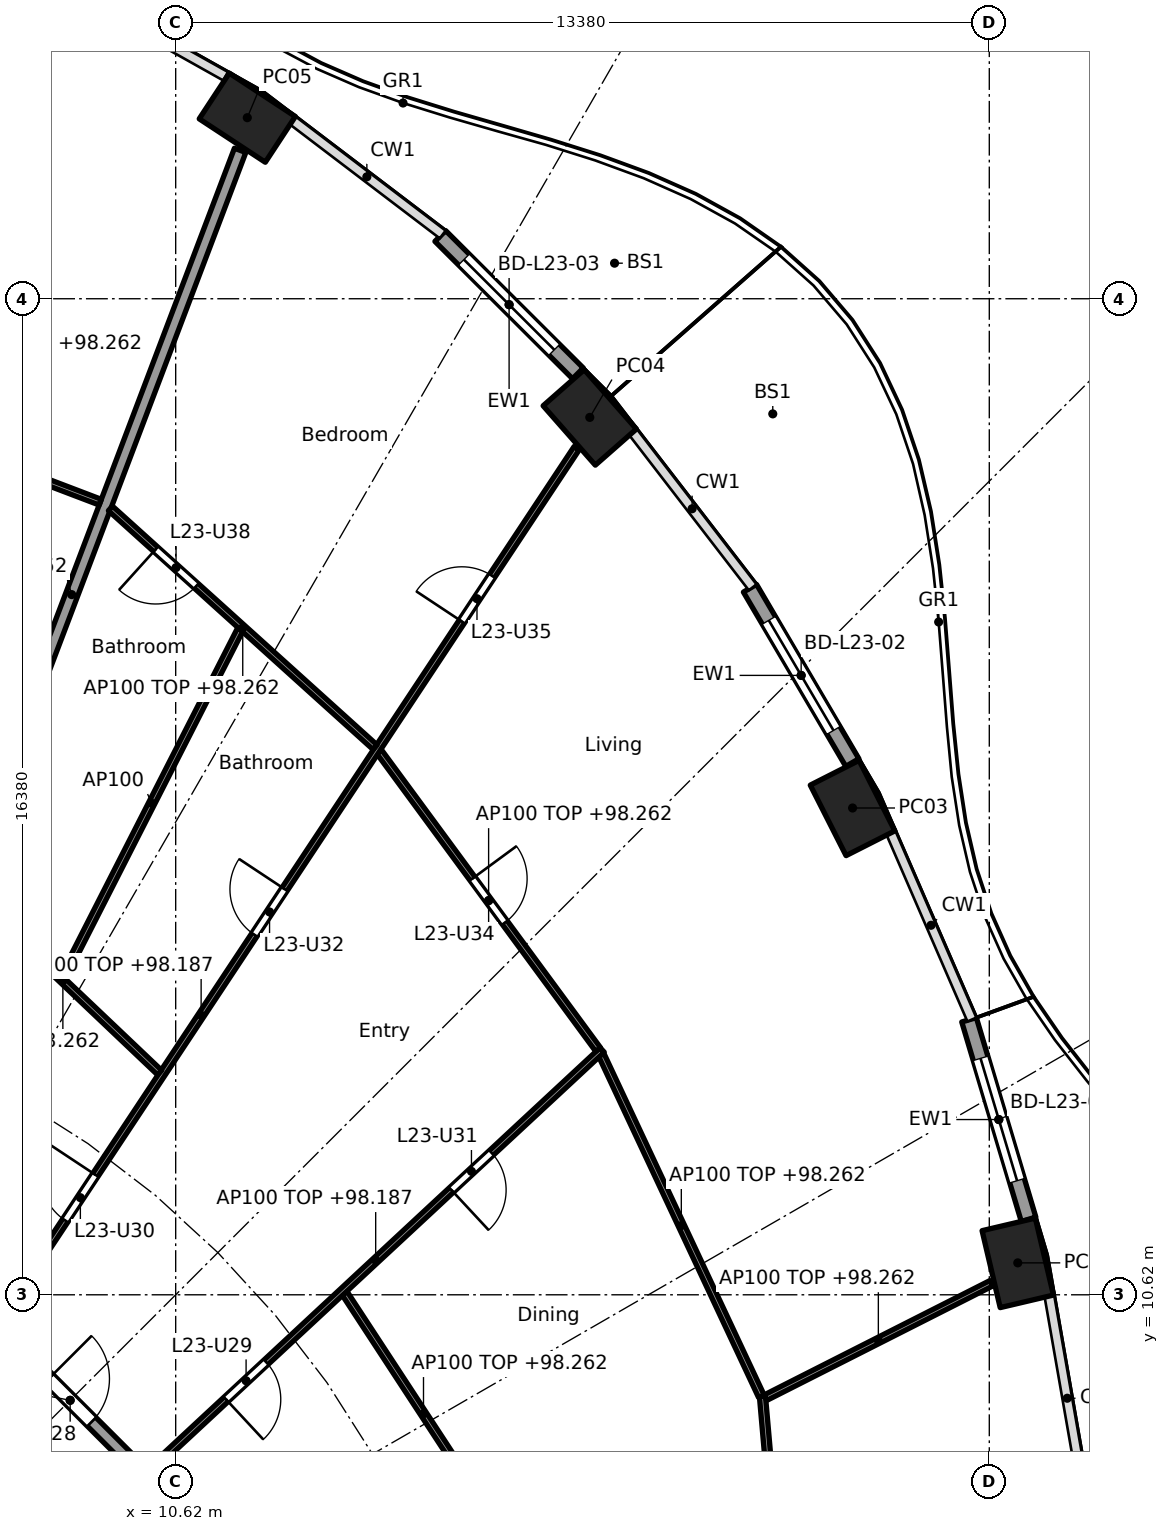
"""IFC4 building model, lengths in metres.
Left out: names, types, materials, properties, quantities, classifications, styles, units other than length and angle.
Written with IfcOpenShell. Run it as: python <this file> out.ifc"""

import sys

from ifc_helpers import new_model, si_unit, direction, frame, frame_2d, origin, origin_2d, place, context, subcontext, project, spatial, rectangle, hollow_rectangle, extrude, element, fill, save


model = new_model("IFC4")
c1 = context("Model", 3, precision=1e-05, world=origin(), true_north=direction((0.0, 1.0)))
c2 = subcontext(c1, "Body", "Model", "MODEL_VIEW")
j1 = project(units=[si_unit("LENGTHUNIT", "METRE"), si_unit("PLANEANGLEUNIT", "RADIAN")], contexts=[c1])
p1 = place(None, origin())
s1 = spatial("IfcSite", under=j1, at=p1, CompositionType="ELEMENT")
p2 = place(p1, origin())
s2 = spatial("IfcBuilding", under=s1, at=p2, CompositionType="ELEMENT")
p3 = place(p2, frame((0.0, 0.0, 95.5)))
s3 = spatial("IfcBuildingStorey", under=s2, at=p3, CompositionType="ELEMENT", Elevation=95.5)
for number, where, z_axis, x_axis in (
    (1, (24.468, 11.145, 0.0), (0.0, 0.0, 1.0), (-0.229, 0.973, 0.0)),
    (2, (21.751, 18.625, 0.0), (0.0, 0.0, 1.0), (-0.452, 0.892, 0.0)),
    (3, (17.43, 25.049, 0.0), (0.0, 0.0, 1.0), (-0.66, 0.751, 0.0)),
    (4, (11.798, 29.978, 0.0), (0.0, 0.0, 1.0), (-0.836, 0.549, 0.0)),
):
    element("IfcColumn", number, at=place(p3, frame(where, z_axis=z_axis, x_axis=x_axis)), inside=s3, PredefinedType="COLUMN", context=c2, shape_type="SweptSolid", body=[
        extrude(hollow_rectangle(XDim=1.3, YDim=0.9, WallThickness=0.045, at=origin_2d()), origin(), (0.0, 0.0, 1.0), 3.7),
    ])
p4 = place(p3, frame((23.667, 15.142, 0.0), z_axis=(0.0, 0.0, 1.0), x_axis=(0.285882094477, -0.958264800594, 0.0)))
e5 = element("IfcWall", 5, at=p4, inside=s3, PredefinedType="SOLIDWALL", context=c2, shape_type="SweptSolid", body=[
    extrude(rectangle(XDim=3.424, YDim=0.25, at=frame_2d((1.712, 0.0))), origin(), (0.0, 0.0, 1.0), 3.44),
])
p5 = place(p4, frame((0.662, 0.0, 0.0)))
e6 = element("IfcOpeningElement", 6, at=p5, cuts=e5, PredefinedType="OPENING", context=c2, shape_type="SweptSolid", body=[
    extrude(rectangle(XDim=2.1, YDim=2.4, at=frame_2d((1.05, 1.2))), frame((0.0, 0.135, 0.0), z_axis=(0.0, -1.0, 0.0), x_axis=(1.0, 0.0, 0.0)), (0.0, 0.0, 1.0), 0.27),
])
p6 = place(p3, frame((20.064, 22.24, 0.0), z_axis=(0.0, 0.0, 1.0), x_axis=(0.506297921217, -0.862358634775, 0.0)))
e7 = element("IfcWall", 7, at=p6, inside=s3, PredefinedType="SOLIDWALL", context=c2, shape_type="SweptSolid", body=[
    extrude(rectangle(XDim=3.325, YDim=0.25, at=frame_2d((1.662, 0.0))), origin(), (0.0, 0.0, 1.0), 3.44),
])
p7 = place(p6, frame((0.612, 0.0, 0.0)))
e8 = element("IfcOpeningElement", 8, at=p7, cuts=e7, PredefinedType="OPENING", context=c2, shape_type="SweptSolid", body=[
    extrude(rectangle(XDim=2.1, YDim=2.4, at=frame_2d((1.05, 1.2))), frame((0.0, 0.135, 0.0), z_axis=(0.0, -1.0, 0.0), x_axis=(1.0, 0.0, 0.0)), (0.0, 0.0, 1.0), 0.27),
])
p8 = place(p3, frame((14.971, 28.032, 0.0), z_axis=(0.0, 0.0, 1.0), x_axis=(0.707793551437, -0.706419343269, 0.0)))
e9 = element("IfcWall", 9, at=p8, inside=s3, PredefinedType="SOLIDWALL", context=c2, shape_type="SweptSolid", body=[
    extrude(rectangle(XDim=3.198, YDim=0.25, at=frame_2d((1.599, 0.0))), origin(), (0.0, 0.0, 1.0), 3.44),
])
p9 = place(p8, frame((0.549, 0.0, 0.0)))
e10 = element("IfcOpeningElement", 10, at=p9, cuts=e9, PredefinedType="OPENING", context=c2, shape_type="SweptSolid", body=[
    extrude(rectangle(XDim=2.1, YDim=2.4, at=frame_2d((1.05, 1.2))), frame((0.0, 0.135, 0.0), z_axis=(0.0, -1.0, 0.0), x_axis=(1.0, 0.0, 0.0)), (0.0, 0.0, 1.0), 0.27),
])
p10 = place(p3, frame((9.988, 4.613, 0.0), z_axis=(0.0, 0.0, 1.0), x_axis=(-0.707106781187, 0.707106781187, 0.0)))
e11 = element("IfcWall", 11, at=p10, inside=s3, PredefinedType="SHEAR", context=c2, shape_type="SweptSolid", body=[
    extrude(rectangle(XDim=7.602, YDim=0.6, at=frame_2d((3.801, 0.0))), origin(), (0.0, 0.0, 1.0), 3.44),
])
p11 = place(p10, frame((3.201, 0.0, 0.0)))
e12 = element("IfcOpeningElement", 12, at=p11, cuts=e11, PredefinedType="OPENING", context=c2, shape_type="SweptSolid", body=[
    extrude(rectangle(XDim=1.2, YDim=2.1, at=frame_2d((0.6, 1.05))), frame((0.0, 0.31, 0.0), z_axis=(0.0, -1.0, 0.0), x_axis=(1.0, 0.0, 0.0)), (0.0, 0.0, 1.0), 0.62),
])
p12 = place(p3, frame((6.141, 14.829, 0.0), z_axis=(0.0, 0.0, 1.0), x_axis=(0.354477134193, 0.935064682968, 0.0)))
e13 = element("IfcWall", 13, at=p12, inside=s3, PredefinedType="PARTITIONING", context=c2, shape_type="SweptSolid", body=[
    extrude(rectangle(XDim=15.626, YDim=0.2, at=frame_2d((7.813, 0.0))), origin(), (0.0, 0.0, 1.0), 2.762),
])
p13 = place(p3, frame((12.635, 5.134, 0.0), z_axis=(0.0, 0.0, 1.0), x_axis=(-0.707106781187, 0.707106781187, 0.0)))
e14 = element("IfcWall", 14, at=p13, inside=s3, PredefinedType="PARTITIONING", context=c2, shape_type="SweptSolid", body=[
    extrude(rectangle(XDim=10.609, YDim=0.2, at=frame_2d((5.305, 0.0))), origin(), (0.0, 0.0, 1.0), 3.44),
])
p14 = place(p13, frame((4.804, 0.0, 0.0)))
e15 = element("IfcOpeningElement", 15, at=p14, cuts=e14, PredefinedType="OPENING", context=c2, shape_type="SweptSolid", body=[
    extrude(rectangle(XDim=1.0, YDim=2.1, at=frame_2d((0.5, 1.05))), frame((0.0, 0.11, 0.0), z_axis=(0.0, -1.0, 0.0), x_axis=(1.0, 0.0, 0.0)), (0.0, 0.0, 1.0), 0.22),
])
p15 = place(p3, frame((20.825, 2.642, 0.0), z_axis=(0.0, 0.0, 1.0), x_axis=(-0.08776338161, 0.996141349834, 0.0)))
e16 = element("IfcWall", 16, at=p15, inside=s3, PredefinedType="PARTITIONING", context=c2, shape_type="SweptSolid", body=[
    extrude(rectangle(XDim=6.337, YDim=0.1, at=frame_2d((3.168, 0.0))), origin(), (0.0, 0.0, 1.0), 2.762),
])
p16 = place(p15, frame((2.694, 0.0, 0.0)))
e17 = element("IfcOpeningElement", 17, at=p16, cuts=e16, PredefinedType="OPENING", context=c2, shape_type="SweptSolid", body=[
    extrude(rectangle(XDim=0.9, YDim=2.1, at=frame_2d((0.45, 1.05))), frame((0.0, 0.06, 0.0), z_axis=(0.0, -1.0, 0.0), x_axis=(1.0, 0.0, 0.0)), (0.0, 0.0, 1.0), 0.12),
])
p17 = place(p3, frame((15.992, 6.68, 0.0), z_axis=(0.0, 0.0, 1.0), x_axis=(-0.547472878942, 0.836823426311, 0.0)))
e18 = element("IfcWall", 18, at=p17, inside=s3, PredefinedType="PARTITIONING", context=c2, shape_type="SweptSolid", body=[
    extrude(rectangle(XDim=4.738, YDim=0.1, at=frame_2d((2.369, 0.0))), origin(), (0.0, 0.0, 1.0), 2.762),
])
p18 = place(p3, frame((20.318, 8.927, 0.0), z_axis=(0.0, 0.0, 1.0), x_axis=(0.892057836959, 0.451921249246, 0.0)))
e19 = element("IfcWall", 19, at=p18, inside=s3, PredefinedType="PARTITIONING", context=c2, shape_type="SweptSolid", body=[
    extrude(rectangle(XDim=4.164, YDim=0.1, at=frame_2d((2.082, 0.0))), origin(), (0.0, 0.0, 1.0), 2.762),
])
p19 = place(p3, frame((20.252, 8.95, 0.0), z_axis=(0.0, 0.0, 1.0), x_axis=(-0.424580052627, 0.90539040138, 0.0)))
e20 = element("IfcWall", 20, at=p19, inside=s3, PredefinedType="PARTITIONING", context=c2, shape_type="SweptSolid", body=[
    extrude(rectangle(XDim=6.204, YDim=0.1, at=frame_2d((3.102, 0.0))), origin(), (0.0, 0.0, 1.0), 2.762),
])
p20 = place(p3, frame((10.185, 7.726, 0.0), z_axis=(0.0, 0.0, 1.0), x_axis=(0.732598472978, 0.680661059112, 0.0)))
e21 = element("IfcWall", 21, at=p20, inside=s3, PredefinedType="PARTITIONING", context=c2, shape_type="SweptSolid", body=[
    extrude(rectangle(XDim=10.167, YDim=0.1, at=frame_2d((5.084, 0.0))), origin(), (0.0, 0.0, 1.0), 2.687),
])
p21 = place(p20, frame((1.725, 0.0, 0.0)))
e22 = element("IfcOpeningElement", 22, at=p21, cuts=e21, PredefinedType="OPENING", context=c2, shape_type="SweptSolid", body=[
    extrude(rectangle(XDim=0.9, YDim=2.1, at=frame_2d((0.45, 1.05))), frame((0.0, 0.06, 0.0), z_axis=(0.0, -1.0, 0.0), x_axis=(1.0, 0.0, 0.0)), (0.0, 0.0, 1.0), 0.12),
])
p22 = place(p20, frame((6.784, 0.0, 0.0)))
e23 = element("IfcOpeningElement", 23, at=p22, cuts=e21, PredefinedType="OPENING", context=c2, shape_type="SweptSolid", body=[
    extrude(rectangle(XDim=0.9, YDim=2.1, at=frame_2d((0.45, 1.05))), frame((0.0, 0.06, 0.0), z_axis=(0.0, -1.0, 0.0), x_axis=(1.0, 0.0, 0.0)), (0.0, 0.0, 1.0), 0.12),
])
p23 = place(p3, frame((17.567, 14.653, 0.0), z_axis=(0.0, 0.0, 1.0), x_axis=(-0.592391983588, 0.80564988536, 0.0)))
e24 = element("IfcWall", 24, at=p23, inside=s3, PredefinedType="PARTITIONING", context=c2, shape_type="SweptSolid", body=[
    extrude(rectangle(XDim=6.08, YDim=0.1, at=frame_2d((3.04, 0.0))), origin(), (0.0, 0.0, 1.0), 2.762),
])
p24 = place(p23, frame((2.59, 0.0, 0.0)))
e25 = element("IfcOpeningElement", 25, at=p24, cuts=e24, PredefinedType="OPENING", context=c2, shape_type="SweptSolid", body=[
    extrude(rectangle(XDim=0.9, YDim=2.1, at=frame_2d((0.45, 1.05))), frame((0.0, 0.06, 0.0), z_axis=(0.0, -1.0, 0.0), x_axis=(1.0, 0.0, 0.0)), (0.0, 0.0, 1.0), 0.12),
])
p25 = place(p3, frame((7.713, 10.195, 0.0), z_axis=(0.0, 0.0, 1.0), x_axis=(0.552111071171, 0.833770571015, 0.0)))
e26 = element("IfcWall", 26, at=p25, inside=s3, PredefinedType="PARTITIONING", context=c2, shape_type="SweptSolid", body=[
    extrude(rectangle(XDim=17.208, YDim=0.1, at=frame_2d((8.604, 0.0))), origin(), (0.0, 0.0, 1.0), 2.687),
])
p26 = place(p25, frame((1.976, 0.0, 0.0)))
e27 = element("IfcOpeningElement", 27, at=p26, cuts=e26, PredefinedType="OPENING", context=c2, shape_type="SweptSolid", body=[
    extrude(rectangle(XDim=0.9, YDim=2.1, at=frame_2d((0.45, 1.05))), frame((0.0, 0.06, 0.0), z_axis=(0.0, -1.0, 0.0), x_axis=(1.0, 0.0, 0.0)), (0.0, 0.0, 1.0), 0.12),
])
p27 = place(p25, frame((7.611, 0.0, 0.0)))
e28 = element("IfcOpeningElement", 28, at=p27, cuts=e26, PredefinedType="OPENING", context=c2, shape_type="SweptSolid", body=[
    extrude(rectangle(XDim=0.9, YDim=2.1, at=frame_2d((0.45, 1.05))), frame((0.0, 0.06, 0.0), z_axis=(0.0, -1.0, 0.0), x_axis=(1.0, 0.0, 0.0)), (0.0, 0.0, 1.0), 0.12),
])
p28 = place(p25, frame((13.79, 0.0, 0.0)))
e29 = element("IfcOpeningElement", 29, at=p28, cuts=e26, PredefinedType="OPENING", context=c2, shape_type="SweptSolid", body=[
    extrude(rectangle(XDim=0.9, YDim=2.1, at=frame_2d((0.45, 1.05))), frame((0.0, 0.06, 0.0), z_axis=(0.0, -1.0, 0.0), x_axis=(1.0, 0.0, 0.0)), (0.0, 0.0, 1.0), 0.12),
])
p29 = place(p3, frame((10.355, 14.274, 0.0), z_axis=(0.0, 0.0, 1.0), x_axis=(-0.725206433622, 0.688531501555, 0.0)))
e30 = element("IfcWall", 30, at=p29, inside=s3, PredefinedType="PARTITIONING", context=c2, shape_type="SweptSolid", body=[
    extrude(rectangle(XDim=4.387, YDim=0.1, at=frame_2d((2.193, 0.0))), origin(), (0.0, 0.0, 1.0), 2.762),
])
p30 = place(p3, frame((13.898, 19.625, 0.0), z_axis=(0.0, 0.0, 1.0), x_axis=(-0.742396654702, 0.669960601146, 0.0)))
e31 = element("IfcWall", 31, at=p30, inside=s3, PredefinedType="PARTITIONING", context=c2, shape_type="SweptSolid", body=[
    extrude(rectangle(XDim=5.861, YDim=0.1, at=frame_2d((2.931, 0.0))), origin(), (0.0, 0.0, 1.0), 2.762),
])
p31 = place(p30, frame((3.958, 0.0, 0.0)))
e32 = element("IfcOpeningElement", 32, at=p31, cuts=e31, PredefinedType="OPENING", context=c2, shape_type="SweptSolid", body=[
    extrude(rectangle(XDim=0.9, YDim=2.1, at=frame_2d((0.45, 1.05))), frame((0.0, 0.06, 0.0), z_axis=(0.0, -1.0, 0.0), x_axis=(1.0, 0.0, 0.0)), (0.0, 0.0, 1.0), 0.12),
])
p32 = place(p3, frame((8.769, 15.846, 0.0), z_axis=(0.0, 0.0, 1.0), x_axis=(0.454067187552, 0.890967445639, 0.0)))
e33 = element("IfcWall", 33, at=p32, inside=s3, PredefinedType="PARTITIONING", context=c2, shape_type="SweptSolid", body=[
    extrude(rectangle(XDim=6.414, YDim=0.1, at=frame_2d((3.207, 0.0))), origin(), (0.0, 0.0, 1.0), 3.44),
])
p33 = place(p3, frame((9.379, 23.655, 0.0), z_axis=(0.0, 0.0, 1.0), x_axis=(-0.934609369022, 0.355675873986, 0.0)))
e34 = element("IfcWall", 34, at=p33, inside=s3, PredefinedType="PARTITIONING", context=c2, shape_type="SweptSolid", body=[
    extrude(rectangle(XDim=5.467, YDim=0.1, at=frame_2d((2.733, 0.0))), origin(), (0.0, 0.0, 1.0), 2.762),
])
p34 = place(p33, frame((2.258, 0.0, 0.0)))
e35 = element("IfcOpeningElement", 35, at=p34, cuts=e34, PredefinedType="OPENING", context=c2, shape_type="SweptSolid", body=[
    extrude(rectangle(XDim=0.9, YDim=2.1, at=frame_2d((0.45, 1.05))), frame((0.0, 0.06, 0.0), z_axis=(0.0, -1.0, 0.0), x_axis=(1.0, 0.0, 0.0)), (0.0, 0.0, 1.0), 0.12),
])
p35 = place(p5, origin())
e36 = element("IfcDoor", 36, at=p35, inside=s3, OperationType="SLIDING_TO_LEFT", PredefinedType="DOOR", context=c2, shape_type="SweptSolid", body=[
    extrude(rectangle(XDim=2.1, YDim=2.4, at=frame_2d((1.05, 1.2))), frame((0.0, 0.025, 0.0), z_axis=(0.0, -1.0, 0.0), x_axis=(1.0, 0.0, 0.0)), (0.0, 0.0, 1.0), 0.05),
])
fill(e6, e36)
p36 = place(p7, origin())
e37 = element("IfcDoor", 37, at=p36, inside=s3, OperationType="SLIDING_TO_LEFT", PredefinedType="DOOR", context=c2, shape_type="SweptSolid", body=[
    extrude(rectangle(XDim=2.1, YDim=2.4, at=frame_2d((1.05, 1.2))), frame((0.0, 0.025, 0.0), z_axis=(0.0, -1.0, 0.0), x_axis=(1.0, 0.0, 0.0)), (0.0, 0.0, 1.0), 0.05),
])
fill(e8, e37)
p37 = place(p9, origin())
e38 = element("IfcDoor", 38, at=p37, inside=s3, OperationType="SLIDING_TO_LEFT", PredefinedType="DOOR", context=c2, shape_type="SweptSolid", body=[
    extrude(rectangle(XDim=2.1, YDim=2.4, at=frame_2d((1.05, 1.2))), frame((0.0, 0.025, 0.0), z_axis=(0.0, -1.0, 0.0), x_axis=(1.0, 0.0, 0.0)), (0.0, 0.0, 1.0), 0.05),
])
fill(e10, e38)
p38 = place(p14, frame((1.0, 0.0, 0.0), x_axis=(-1.0, 0.0, 0.0)))
e39 = element("IfcDoor", 39, at=p38, inside=s3, OperationType="SINGLE_SWING_LEFT", PredefinedType="DOOR", context=c2, shape_type="SweptSolid", body=[
    extrude(rectangle(XDim=1.0, YDim=2.1, at=frame_2d((0.5, 1.05))), frame((0.0, 0.025, 0.0), z_axis=(0.0, -1.0, 0.0), x_axis=(1.0, 0.0, 0.0)), (0.0, 0.0, 1.0), 0.05),
])
fill(e15, e39)
p39 = place(p21, frame((0.9, 0.0, 0.0), x_axis=(-1.0, 0.0, 0.0)))
e40 = element("IfcDoor", 40, at=p39, inside=s3, OperationType="SINGLE_SWING_RIGHT", PredefinedType="DOOR", context=c2, shape_type="SweptSolid", body=[
    extrude(rectangle(XDim=0.9, YDim=2.1, at=frame_2d((0.45, 1.05))), frame((0.0, 0.025, 0.0), z_axis=(0.0, -1.0, 0.0), x_axis=(1.0, 0.0, 0.0)), (0.0, 0.0, 1.0), 0.05),
])
fill(e22, e40)
p40 = place(p26, origin())
e41 = element("IfcDoor", 41, at=p40, inside=s3, OperationType="SINGLE_SWING_RIGHT", PredefinedType="DOOR", context=c2, shape_type="SweptSolid", body=[
    extrude(rectangle(XDim=0.9, YDim=2.1, at=frame_2d((0.45, 1.05))), frame((0.0, 0.025, 0.0), z_axis=(0.0, -1.0, 0.0), x_axis=(1.0, 0.0, 0.0)), (0.0, 0.0, 1.0), 0.05),
])
fill(e27, e41)
p41 = place(p22, frame((0.9, 0.0, 0.0), x_axis=(-1.0, 0.0, 0.0)))
e42 = element("IfcDoor", 42, at=p41, inside=s3, OperationType="SINGLE_SWING_RIGHT", PredefinedType="DOOR", context=c2, shape_type="SweptSolid", body=[
    extrude(rectangle(XDim=0.9, YDim=2.1, at=frame_2d((0.45, 1.05))), frame((0.0, 0.025, 0.0), z_axis=(0.0, -1.0, 0.0), x_axis=(1.0, 0.0, 0.0)), (0.0, 0.0, 1.0), 0.05),
])
fill(e23, e42)
p42 = place(p27, origin())
e43 = element("IfcDoor", 43, at=p42, inside=s3, OperationType="SINGLE_SWING_RIGHT", PredefinedType="DOOR", context=c2, shape_type="SweptSolid", body=[
    extrude(rectangle(XDim=0.9, YDim=2.1, at=frame_2d((0.45, 1.05))), frame((0.0, 0.025, 0.0), z_axis=(0.0, -1.0, 0.0), x_axis=(1.0, 0.0, 0.0)), (0.0, 0.0, 1.0), 0.05),
])
fill(e28, e43)
p43 = place(p24, frame((0.9, 0.0, 0.0), x_axis=(-1.0, 0.0, 0.0)))
e44 = element("IfcDoor", 44, at=p43, inside=s3, OperationType="SINGLE_SWING_LEFT", PredefinedType="DOOR", context=c2, shape_type="SweptSolid", body=[
    extrude(rectangle(XDim=0.9, YDim=2.1, at=frame_2d((0.45, 1.05))), frame((0.0, 0.025, 0.0), z_axis=(0.0, -1.0, 0.0), x_axis=(1.0, 0.0, 0.0)), (0.0, 0.0, 1.0), 0.05),
])
fill(e25, e44)
p44 = place(p28, origin())
e45 = element("IfcDoor", 45, at=p44, inside=s3, OperationType="SINGLE_SWING_LEFT", PredefinedType="DOOR", context=c2, shape_type="SweptSolid", body=[
    extrude(rectangle(XDim=0.9, YDim=2.1, at=frame_2d((0.45, 1.05))), frame((0.0, 0.025, 0.0), z_axis=(0.0, -1.0, 0.0), x_axis=(1.0, 0.0, 0.0)), (0.0, 0.0, 1.0), 0.05),
])
fill(e29, e45)
p45 = place(p31, origin())
e46 = element("IfcDoor", 46, at=p45, inside=s3, OperationType="SINGLE_SWING_RIGHT", PredefinedType="DOOR", context=c2, shape_type="SweptSolid", body=[
    extrude(rectangle(XDim=0.9, YDim=2.1, at=frame_2d((0.45, 1.05))), frame((0.0, 0.025, 0.0), z_axis=(0.0, -1.0, 0.0), x_axis=(1.0, 0.0, 0.0)), (0.0, 0.0, 1.0), 0.05),
])
fill(e32, e46)
save(model, sys.argv[1])
